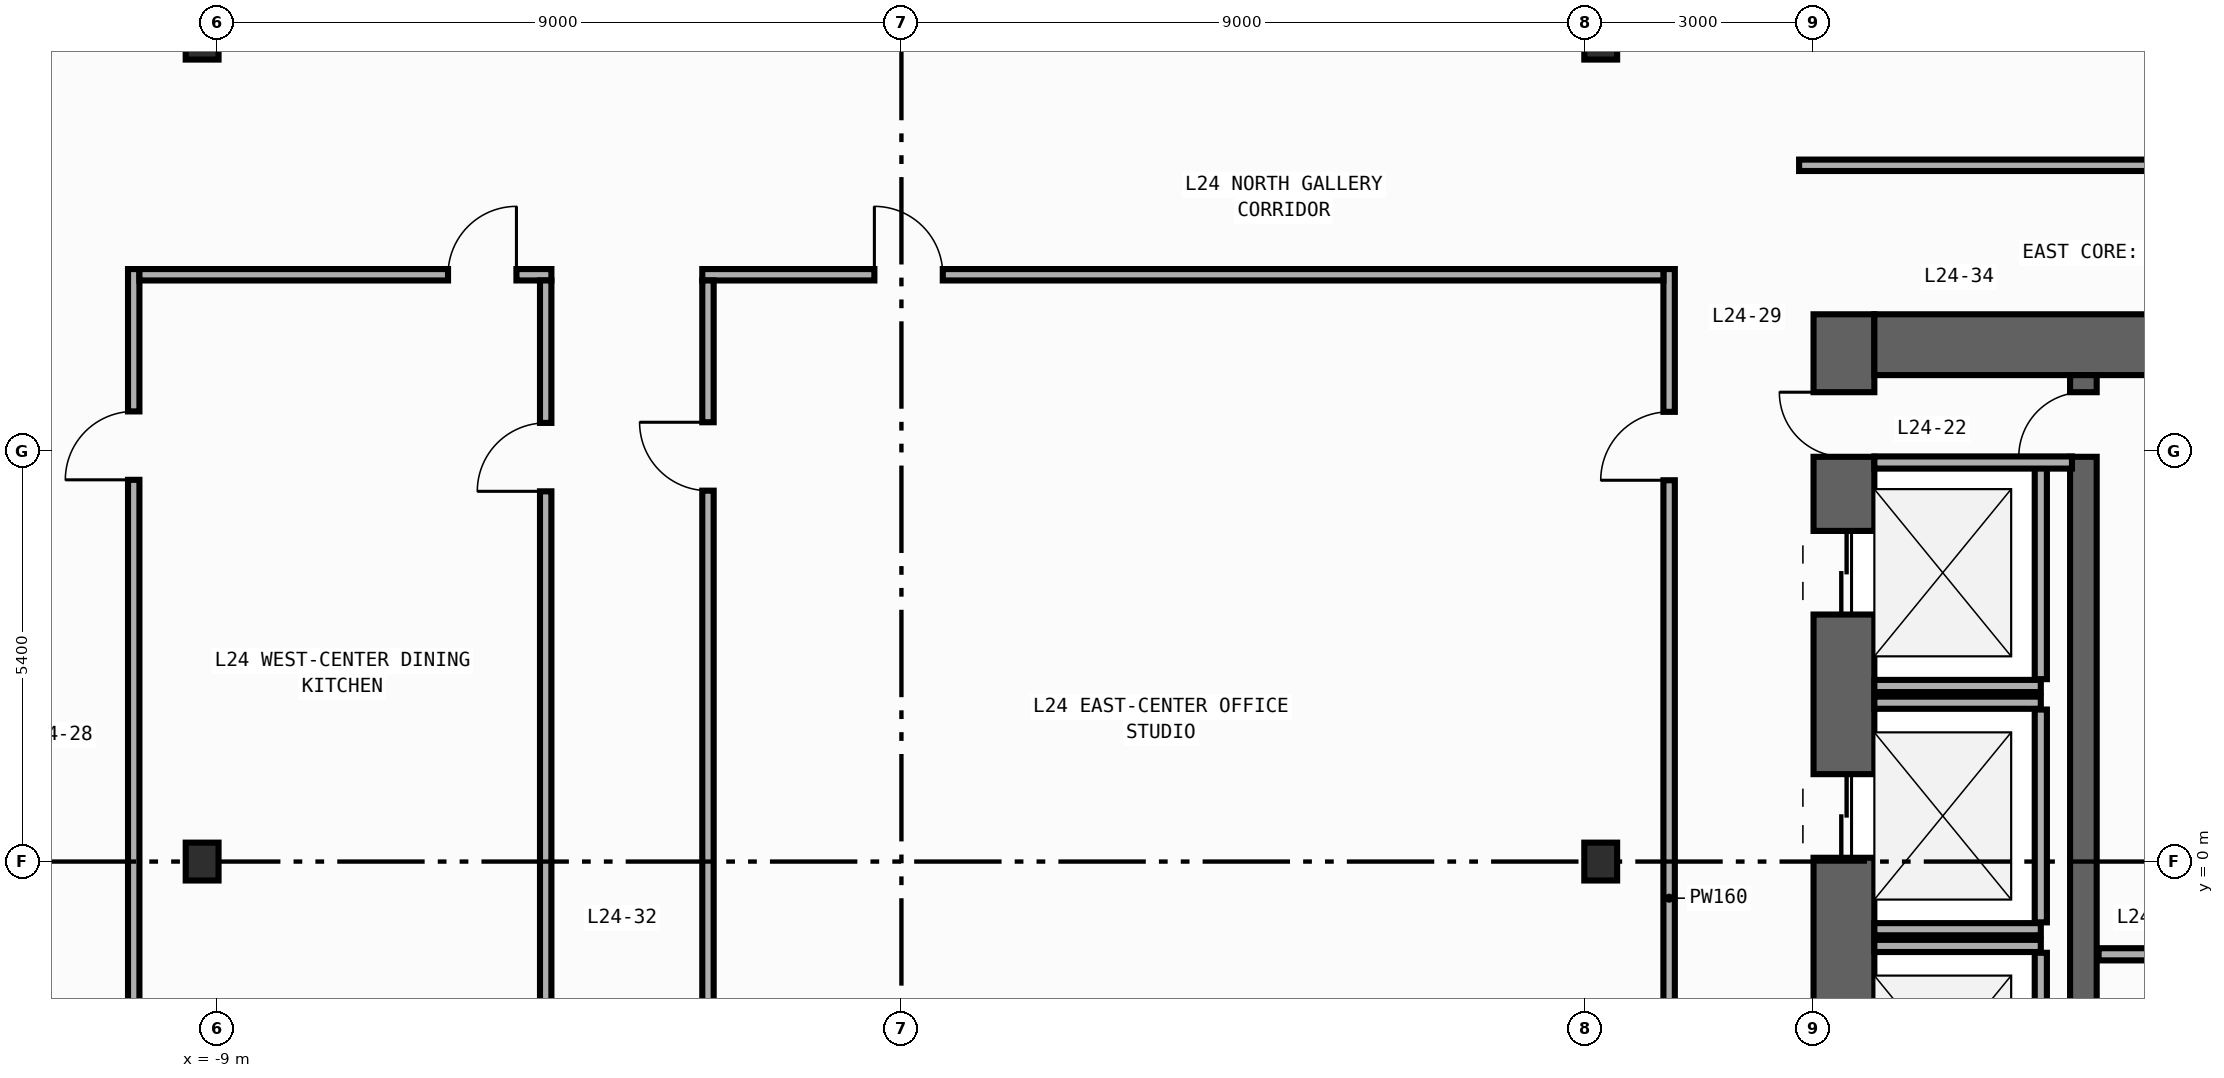
"""IFC4 building model, lengths in metres.
Left out: names, types, materials, properties, quantities, classifications, styles, units other than length and angle.
Written with IfcOpenShell. Run it as: python <this file> out.ifc"""

import sys

from ifc_helpers import new_model, si_unit, direction, frame, frame_2d, origin, origin_2d, place, context, subcontext, project, spatial, rectangle, i_section, extrude, element, fill, save


model = new_model("IFC4")
c1 = context("Model", 3, precision=1e-05, world=origin(), true_north=direction((0.0, 1.0)))
c2 = subcontext(c1, "Body", "Model", "MODEL_VIEW")
j1 = project(units=[si_unit("LENGTHUNIT", "METRE"), si_unit("PLANEANGLEUNIT", "RADIAN")], contexts=[c1])
p1 = place(None, origin())
s1 = spatial("IfcSite", under=j1, at=p1, CompositionType="ELEMENT")
p2 = place(p1, origin())
s2 = spatial("IfcBuilding", under=s1, at=p2, CompositionType="ELEMENT")
p3 = place(p2, frame((0.0, 0.0, 105.8)))
s3 = spatial("IfcBuildingStorey", under=s2, at=p3, CompositionType="ELEMENT", Elevation=105.8)
p4 = place(p3, frame((12.4, -19.8, 0.0), z_axis=(0.0, 0.0, 1.0), x_axis=(0.0, 1.0, 0.0)))
e1 = element("IfcWall", 1, at=p4, inside=s3, PredefinedType="SHEAR", context=c2, shape_type="SweptSolid", body=[
    extrude(rectangle(XDim=27.0, YDim=0.8, at=frame_2d((13.5, 0.0))), origin(), (0.0, 0.0, 1.0), 3.94),
])
p5 = place(p4, frame((23.05, 0.0, 0.0)))
e2 = element("IfcOpeningElement", 2, at=p5, cuts=e1, PredefinedType="OPENING", context=c2, shape_type="SweptSolid", body=[
    extrude(rectangle(XDim=1.1, YDim=2.2, at=frame_2d((0.55, 1.1))), frame((0.0, 0.41, 0.0), z_axis=(0.0, -1.0, 0.0), x_axis=(1.0, 0.0, 0.0)), (0.0, 0.0, 1.0), 0.82),
])
p6 = place(p4, frame((19.85, 0.0, 0.0)))
e3 = element("IfcOpeningElement", 3, at=p6, cuts=e1, PredefinedType="OPENING", context=c2, shape_type="SweptSolid", body=[
    extrude(rectangle(XDim=1.1, YDim=2.2, at=frame_2d((0.55, 1.1))), frame((0.0, 0.41, 0.0), z_axis=(0.0, -1.0, 0.0), x_axis=(1.0, 0.0, 0.0)), (0.0, 0.0, 1.0), 0.82),
])
p7 = place(p4, frame((16.65, 0.0, 0.0)))
e4 = element("IfcOpeningElement", 4, at=p7, cuts=e1, PredefinedType="OPENING", context=c2, shape_type="SweptSolid", body=[
    extrude(rectangle(XDim=1.1, YDim=2.2, at=frame_2d((0.55, 1.1))), frame((0.0, 0.41, 0.0), z_axis=(0.0, -1.0, 0.0), x_axis=(1.0, 0.0, 0.0)), (0.0, 0.0, 1.0), 0.82),
])
p8 = place(p4, frame((7.175, 0.0, 0.0)))
e5 = element("IfcOpeningElement", 5, at=p8, cuts=e1, PredefinedType="OPENING", context=c2, shape_type="SweptSolid", body=[
    extrude(rectangle(XDim=0.85, YDim=2.1, at=frame_2d((0.425, 1.05))), frame((0.0, 0.41, 0.0), z_axis=(0.0, -1.0, 0.0), x_axis=(1.0, 0.0, 0.0)), (0.0, 0.0, 1.0), 0.82),
])
p9 = place(p4, frame((10.375, 0.0, 0.0)))
e6 = element("IfcOpeningElement", 6, at=p9, cuts=e1, PredefinedType="OPENING", context=c2, shape_type="SweptSolid", body=[
    extrude(rectangle(XDim=0.85, YDim=2.1, at=frame_2d((0.425, 1.05))), frame((0.0, 0.41, 0.0), z_axis=(0.0, -1.0, 0.0), x_axis=(1.0, 0.0, 0.0)), (0.0, 0.0, 1.0), 0.82),
])
p10 = place(p4, frame((12.725, 0.0, 0.0)))
e7 = element("IfcOpeningElement", 7, at=p10, cuts=e1, PredefinedType="OPENING", context=c2, shape_type="SweptSolid", body=[
    extrude(rectangle(XDim=1.15, YDim=2.2, at=frame_2d((0.575, 1.1))), frame((0.0, 0.41, 0.0), z_axis=(0.0, -1.0, 0.0), x_axis=(1.0, 0.0, 0.0)), (0.0, 0.0, 1.0), 0.82),
])
p11 = place(p4, frame((25.125, 0.0, 0.0)))
e8 = element("IfcOpeningElement", 8, at=p11, cuts=e1, PredefinedType="OPENING", context=c2, shape_type="SweptSolid", body=[
    extrude(rectangle(XDim=0.85, YDim=2.1, at=frame_2d((0.425, 1.05))), frame((0.0, 0.41, 0.0), z_axis=(0.0, -1.0, 0.0), x_axis=(1.0, 0.0, 0.0)), (0.0, 0.0, 1.0), 0.82),
])
p12 = place(p3, frame((12.8, 6.8, 0.0), z_axis=(0.0, 0.0, 1.0), x_axis=(1.0, 0.0, 0.0)))
e9 = element("IfcWall", 9, at=p12, inside=s3, PredefinedType="SHEAR", context=c2, shape_type="SweptSolid", body=[
    extrude(rectangle(XDim=6.8, YDim=0.8, at=frame_2d((3.4, 0.0))), origin(), (0.0, 0.0, 1.0), 3.94),
])
p13 = place(p3, frame((15.55, -19.0, 0.0), z_axis=(0.0, 0.0, 1.0), x_axis=(0.0, 1.0, 0.0)))
e10 = element("IfcWall", 10, at=p13, inside=s3, PredefinedType="SHEAR", context=c2, shape_type="SweptSolid", body=[
    extrude(rectangle(XDim=25.4, YDim=0.35, at=frame_2d((12.7, 0.0))), origin(), (0.0, 0.0, 1.0), 3.94),
])
p14 = place(p13, frame((11.925, 0.0, 0.0)))
e11 = element("IfcOpeningElement", 11, at=p14, cuts=e10, PredefinedType="OPENING", context=c2, shape_type="SweptSolid", body=[
    extrude(rectangle(XDim=1.15, YDim=2.2, at=frame_2d((0.575, 1.1))), frame((0.0, 0.185, 0.0), z_axis=(0.0, -1.0, 0.0), x_axis=(1.0, 0.0, 0.0)), (0.0, 0.0, 1.0), 0.37),
])
p15 = place(p13, frame((24.325, 0.0, 0.0)))
e12 = element("IfcOpeningElement", 12, at=p15, cuts=e10, PredefinedType="OPENING", context=c2, shape_type="SweptSolid", body=[
    extrude(rectangle(XDim=0.85, YDim=2.1, at=frame_2d((0.425, 1.05))), frame((0.0, 0.185, 0.0), z_axis=(0.0, -1.0, 0.0), x_axis=(1.0, 0.0, 0.0)), (0.0, 0.0, 1.0), 0.37),
])
for number, where, z_axis, x_axis in (
    (13, (-9.2, 0.0, 0.0), (0.0, 0.0, 1.0), (1.0, 0.0, 0.0)),
    (14, (-9.2, 10.8, 0.0), (0.0, 0.0, 1.0), (1.0, 0.0, 0.0)),
    (15, (9.2, 0.0, 0.0), (0.0, 0.0, 1.0), (1.0, 0.0, 0.0)),
    (16, (9.2, 10.8, 0.0), (0.0, 0.0, 1.0), (1.0, 0.0, 0.0)),
):
    element("IfcColumn", number, at=place(p3, frame(where, z_axis=z_axis, x_axis=x_axis)), inside=s3, PredefinedType="COLUMN", context=c2, shape_type="SweptSolid", body=[
        extrude(i_section(OverallWidth=0.432, OverallDepth=0.498, WebThickness=0.045, FlangeThickness=0.07, FilletRadius=0.022, at=origin_2d()), origin(), (0.0, 0.0, 1.0), 4.2),
    ])
p16 = place(p3, frame((12.8, 2.31, 0.0), z_axis=(0.0, 0.0, 1.0), x_axis=(1.0, 0.0, 0.0)))
e17 = element("IfcWall", 17, at=p16, inside=s3, PredefinedType="STANDARD", context=c2, shape_type="SweptSolid", body=[
    extrude(rectangle(XDim=2.19, YDim=0.16, at=frame_2d((1.095, 0.0))), origin(), (0.0, 0.0, 1.0), 3.94),
])
p17 = place(p3, frame((14.99, 2.4, 0.0), z_axis=(0.0, 0.0, 1.0), x_axis=(0.0, 1.0, 0.0)))
e18 = element("IfcWall", 18, at=p17, inside=s3, PredefinedType="STANDARD", context=c2, shape_type="SweptSolid", body=[
    extrude(rectangle(XDim=2.8, YDim=0.16, at=frame_2d((1.4, 0.0))), origin(), (0.0, 0.0, 1.0), 3.94),
])
for number, where, z_axis, x_axis in (
    (19, (12.8, -0.89, 0.0), (0.0, 0.0, 1.0), (1.0, 0.0, 0.0)),
    (20, (12.8, 2.09, 0.0), (0.0, 0.0, 1.0), (1.0, 0.0, 0.0)),
):
    element("IfcWall", number, at=place(p3, frame(where, z_axis=z_axis, x_axis=x_axis)), inside=s3, PredefinedType="STANDARD", context=c2, shape_type="SweptSolid", body=[
        extrude(rectangle(XDim=2.19, YDim=0.16, at=frame_2d((1.095, 0.0))), origin(), (0.0, 0.0, 1.0), 3.94),
    ])
p18 = place(p3, frame((14.99, -0.8, 0.0), z_axis=(0.0, 0.0, 1.0), x_axis=(0.0, 1.0, 0.0)))
e21 = element("IfcWall", 21, at=p18, inside=s3, PredefinedType="STANDARD", context=c2, shape_type="SweptSolid", body=[
    extrude(rectangle(XDim=2.8, YDim=0.16, at=frame_2d((1.4, 0.0))), origin(), (0.0, 0.0, 1.0), 3.94),
])
p19 = place(p3, frame((12.8, -1.11, 0.0), z_axis=(0.0, 0.0, 1.0), x_axis=(1.0, 0.0, 0.0)))
e22 = element("IfcWall", 22, at=p19, inside=s3, PredefinedType="STANDARD", context=c2, shape_type="SweptSolid", body=[
    extrude(rectangle(XDim=2.19, YDim=0.16, at=frame_2d((1.095, 0.0))), origin(), (0.0, 0.0, 1.0), 3.94),
])
p20 = place(p3, frame((14.99, -4.0, 0.0), z_axis=(0.0, 0.0, 1.0), x_axis=(0.0, 1.0, 0.0)))
e23 = element("IfcWall", 23, at=p20, inside=s3, PredefinedType="STANDARD", context=c2, shape_type="SweptSolid", body=[
    extrude(rectangle(XDim=2.8, YDim=0.16, at=frame_2d((1.4, 0.0))), origin(), (0.0, 0.0, 1.0), 3.94),
])
p21 = place(p3, frame((15.75, -1.22, 0.0), z_axis=(0.0, 0.0, 1.0), x_axis=(1.0, 0.0, 0.0)))
e24 = element("IfcWall", 24, at=p21, inside=s3, PredefinedType="STANDARD", context=c2, shape_type="SweptSolid", body=[
    extrude(rectangle(XDim=3.8, YDim=0.16, at=frame_2d((1.9, 0.0))), origin(), (0.0, 0.0, 1.0), 3.94),
])
p22 = place(p3, frame((12.8, 5.25, 0.0), z_axis=(0.0, 0.0, 1.0), x_axis=(1.0, 0.0, 0.0)))
e25 = element("IfcWall", 25, at=p22, inside=s3, PredefinedType="STANDARD", context=c2, shape_type="SweptSolid", body=[
    extrude(rectangle(XDim=2.6, YDim=0.16, at=frame_2d((1.3, 0.0))), origin(), (0.0, 0.0, 1.0), 3.94),
])
p23 = place(p3, frame((-10.1, -4.52, 0.0), z_axis=(0.0, 0.0, 1.0), x_axis=(0.0, 1.0, 0.0)))
e26 = element("IfcWall", 26, at=p23, inside=s3, PredefinedType="PARTITIONING", context=c2, shape_type="SweptSolid", body=[
    extrude(rectangle(XDim=12.315, YDim=0.15, at=frame_2d((6.157, 0.0))), origin(), (0.0, 0.0, 1.0), 3.94),
])
p24 = place(p23, frame((9.542, 0.0, 0.0)))
e27 = element("IfcOpeningElement", 27, at=p24, cuts=e26, PredefinedType="OPENING", context=c2, shape_type="SweptSolid", body=[
    extrude(rectangle(XDim=0.9, YDim=2.15, at=frame_2d((0.45, 1.075))), frame((0.0, 0.085, 0.0), z_axis=(0.0, -1.0, 0.0), x_axis=(1.0, 0.0, 0.0)), (0.0, 0.0, 1.0), 0.17),
])
p25 = place(p3, frame((10.1, -5.98, 0.0), z_axis=(0.0, 0.0, 1.0), x_axis=(0.0, 1.0, 0.0)))
e28 = element("IfcWall", 28, at=p25, inside=s3, PredefinedType="PARTITIONING", context=c2, shape_type="SweptSolid", body=[
    extrude(rectangle(XDim=13.775, YDim=0.15, at=frame_2d((6.887, 0.0))), origin(), (0.0, 0.0, 1.0), 3.94),
])
p26 = place(p25, frame((10.997, 0.0, 0.0)))
e29 = element("IfcOpeningElement", 29, at=p26, cuts=e28, PredefinedType="OPENING", context=c2, shape_type="SweptSolid", body=[
    extrude(rectangle(XDim=0.9, YDim=2.15, at=frame_2d((0.45, 1.075))), frame((0.0, 0.085, 0.0), z_axis=(0.0, -1.0, 0.0), x_axis=(1.0, 0.0, 0.0)), (0.0, 0.0, 1.0), 0.17),
])
p27 = place(p3, frame((-2.62, 7.72, 0.0), z_axis=(0.0, 0.0, 1.0), x_axis=(1.0, 0.0, 0.0)))
e30 = element("IfcWall", 30, at=p27, inside=s3, PredefinedType="PARTITIONING", context=c2, shape_type="SweptSolid", body=[
    extrude(rectangle(XDim=12.645, YDim=0.15, at=frame_2d((6.323, 0.0))), origin(), (0.0, 0.0, 1.0), 3.94),
])
p28 = place(p27, frame((2.264, 0.0, 0.0)))
e31 = element("IfcOpeningElement", 31, at=p28, cuts=e30, PredefinedType="OPENING", context=c2, shape_type="SweptSolid", body=[
    extrude(rectangle(XDim=0.9, YDim=2.15, at=frame_2d((0.45, 1.075))), frame((0.0, 0.085, 0.0), z_axis=(0.0, -1.0, 0.0), x_axis=(1.0, 0.0, 0.0)), (0.0, 0.0, 1.0), 0.17),
])
p29 = place(p3, frame((-10.025, 7.72, 0.0), z_axis=(0.0, 0.0, 1.0), x_axis=(1.0, 0.0, 0.0)))
e32 = element("IfcWall", 32, at=p29, inside=s3, PredefinedType="PARTITIONING", context=c2, shape_type="SweptSolid", body=[
    extrude(rectangle(XDim=5.42, YDim=0.15, at=frame_2d((2.71, 0.0))), origin(), (0.0, 0.0, 1.0), 3.94),
])
p30 = place(p29, frame((4.06, 0.0, 0.0)))
e33 = element("IfcOpeningElement", 33, at=p30, cuts=e32, PredefinedType="OPENING", context=c2, shape_type="SweptSolid", body=[
    extrude(rectangle(XDim=0.9, YDim=2.15, at=frame_2d((0.45, 1.075))), frame((0.0, 0.085, 0.0), z_axis=(0.0, -1.0, 0.0), x_axis=(1.0, 0.0, 0.0)), (0.0, 0.0, 1.0), 0.17),
])
p31 = place(p3, frame((-2.545, -5.82, 0.0), z_axis=(0.0, 0.0, 1.0), x_axis=(0.0, 1.0, 0.0)))
e34 = element("IfcWall", 34, at=p31, inside=s3, PredefinedType="PARTITIONING", context=c2, shape_type="SweptSolid", body=[
    extrude(rectangle(XDim=13.465, YDim=0.15, at=frame_2d((6.732, 0.0))), origin(), (0.0, 0.0, 1.0), 3.94),
])
p32 = place(p31, frame((10.7, 0.0, 0.0)))
e35 = element("IfcOpeningElement", 35, at=p32, cuts=e34, PredefinedType="OPENING", context=c2, shape_type="SweptSolid", body=[
    extrude(rectangle(XDim=0.9, YDim=2.15, at=frame_2d((0.45, 1.075))), frame((0.0, 0.085, 0.0), z_axis=(0.0, -1.0, 0.0), x_axis=(1.0, 0.0, 0.0)), (0.0, 0.0, 1.0), 0.17),
])
p33 = place(p3, frame((-4.68, -4.68, 0.0), z_axis=(0.0, 0.0, 1.0), x_axis=(0.0, 1.0, 0.0)))
e36 = element("IfcWall", 36, at=p33, inside=s3, PredefinedType="PARTITIONING", context=c2, shape_type="SweptSolid", body=[
    extrude(rectangle(XDim=12.325, YDim=0.15, at=frame_2d((6.163, 0.0))), origin(), (0.0, 0.0, 1.0), 3.49),
])
p34 = place(p33, frame((9.551, 0.0, 0.0)))
e37 = element("IfcOpeningElement", 37, at=p34, cuts=e36, PredefinedType="OPENING", context=c2, shape_type="SweptSolid", body=[
    extrude(rectangle(XDim=0.9, YDim=2.15, at=frame_2d((0.45, 1.075))), frame((0.0, 0.085, 0.0), z_axis=(0.0, -1.0, 0.0), x_axis=(1.0, 0.0, 0.0)), (0.0, 0.0, 1.0), 0.17),
])
p35 = place(p3, frame((11.81, 9.16, 0.0), z_axis=(0.0, 0.0, 1.0), x_axis=(1.0, 0.0, 0.0)))
e38 = element("IfcWall", 38, at=p35, inside=s3, PredefinedType="PARTITIONING", context=c2, shape_type="SweptSolid", body=[
    extrude(rectangle(XDim=8.83, YDim=0.15, at=frame_2d((4.415, 0.0))), origin(), (0.0, 0.0, 1.0), 3.94),
])
p36 = place(p35, frame((5.067, 0.0, 0.0)))
e39 = element("IfcOpeningElement", 39, at=p36, cuts=e38, PredefinedType="OPENING", context=c2, shape_type="SweptSolid", body=[
    extrude(rectangle(XDim=0.9, YDim=2.15, at=frame_2d((0.45, 1.075))), frame((0.0, 0.085, 0.0), z_axis=(0.0, -1.0, 0.0), x_axis=(1.0, 0.0, 0.0)), (0.0, 0.0, 1.0), 0.17),
])
p37 = place(p5, origin())
e40 = element("IfcDoor", 40, at=p37, inside=s3, OperationType="DOUBLE_DOOR_SLIDING", PredefinedType="DOOR", context=c2, shape_type="SweptSolid", body=[
    extrude(rectangle(XDim=1.1, YDim=2.2, at=frame_2d((0.55, 1.1))), frame((0.0, 0.025, 0.0), z_axis=(0.0, -1.0, 0.0), x_axis=(1.0, 0.0, 0.0)), (0.0, 0.0, 1.0), 0.05),
])
fill(e2, e40)
p38 = place(p6, origin())
e41 = element("IfcDoor", 41, at=p38, inside=s3, OperationType="DOUBLE_DOOR_SLIDING", PredefinedType="DOOR", context=c2, shape_type="SweptSolid", body=[
    extrude(rectangle(XDim=1.1, YDim=2.2, at=frame_2d((0.55, 1.1))), frame((0.0, 0.025, 0.0), z_axis=(0.0, -1.0, 0.0), x_axis=(1.0, 0.0, 0.0)), (0.0, 0.0, 1.0), 0.05),
])
fill(e3, e41)
p39 = place(p11, origin())
e42 = element("IfcDoor", 42, at=p39, inside=s3, OperationType="SINGLE_SWING_RIGHT", PredefinedType="DOOR", context=c2, shape_type="SweptSolid", body=[
    extrude(rectangle(XDim=0.85, YDim=2.1, at=frame_2d((0.425, 1.05))), frame((0.0, 0.025, 0.0), z_axis=(0.0, -1.0, 0.0), x_axis=(1.0, 0.0, 0.0)), (0.0, 0.0, 1.0), 0.05),
])
fill(e8, e42)
p40 = place(p15, origin())
e43 = element("IfcDoor", 43, at=p40, inside=s3, OperationType="SINGLE_SWING_LEFT", PredefinedType="DOOR", context=c2, shape_type="SweptSolid", body=[
    extrude(rectangle(XDim=0.85, YDim=2.1, at=frame_2d((0.425, 1.05))), frame((0.0, 0.025, 0.0), z_axis=(0.0, -1.0, 0.0), x_axis=(1.0, 0.0, 0.0)), (0.0, 0.0, 1.0), 0.05),
])
fill(e12, e43)
p41 = place(p24, origin())
e44 = element("IfcDoor", 44, at=p41, inside=s3, OperationType="SINGLE_SWING_LEFT", PredefinedType="DOOR", context=c2, shape_type="SweptSolid", body=[
    extrude(rectangle(XDim=0.9, YDim=2.15, at=frame_2d((0.45, 1.075))), frame((0.0, 0.025, 0.0), z_axis=(0.0, -1.0, 0.0), x_axis=(1.0, 0.0, 0.0)), (0.0, 0.0, 1.0), 0.05),
])
fill(e27, e44)
p42 = place(p26, origin())
e45 = element("IfcDoor", 45, at=p42, inside=s3, OperationType="SINGLE_SWING_LEFT", PredefinedType="DOOR", context=c2, shape_type="SweptSolid", body=[
    extrude(rectangle(XDim=0.9, YDim=2.15, at=frame_2d((0.45, 1.075))), frame((0.0, 0.025, 0.0), z_axis=(0.0, -1.0, 0.0), x_axis=(1.0, 0.0, 0.0)), (0.0, 0.0, 1.0), 0.05),
])
fill(e29, e45)
p43 = place(p28, origin())
e46 = element("IfcDoor", 46, at=p43, inside=s3, OperationType="SINGLE_SWING_LEFT", PredefinedType="DOOR", context=c2, shape_type="SweptSolid", body=[
    extrude(rectangle(XDim=0.9, YDim=2.15, at=frame_2d((0.45, 1.075))), frame((0.0, 0.025, 0.0), z_axis=(0.0, -1.0, 0.0), x_axis=(1.0, 0.0, 0.0)), (0.0, 0.0, 1.0), 0.05),
])
fill(e31, e46)
p44 = place(p30, origin())
e47 = element("IfcDoor", 47, at=p44, inside=s3, OperationType="SINGLE_SWING_RIGHT", PredefinedType="DOOR", context=c2, shape_type="SweptSolid", body=[
    extrude(rectangle(XDim=0.9, YDim=2.15, at=frame_2d((0.45, 1.075))), frame((0.0, 0.025, 0.0), z_axis=(0.0, -1.0, 0.0), x_axis=(1.0, 0.0, 0.0)), (0.0, 0.0, 1.0), 0.05),
])
fill(e33, e47)
p45 = place(p32, origin())
e48 = element("IfcDoor", 48, at=p45, inside=s3, OperationType="SINGLE_SWING_RIGHT", PredefinedType="DOOR", context=c2, shape_type="SweptSolid", body=[
    extrude(rectangle(XDim=0.9, YDim=2.15, at=frame_2d((0.45, 1.075))), frame((0.0, 0.025, 0.0), z_axis=(0.0, -1.0, 0.0), x_axis=(1.0, 0.0, 0.0)), (0.0, 0.0, 1.0), 0.05),
])
fill(e35, e48)
p46 = place(p34, origin())
e49 = element("IfcDoor", 49, at=p46, inside=s3, OperationType="SINGLE_SWING_LEFT", PredefinedType="DOOR", context=c2, shape_type="SweptSolid", body=[
    extrude(rectangle(XDim=0.9, YDim=2.15, at=frame_2d((0.45, 1.075))), frame((0.0, 0.025, 0.0), z_axis=(0.0, -1.0, 0.0), x_axis=(1.0, 0.0, 0.0)), (0.0, 0.0, 1.0), 0.05),
])
fill(e37, e49)
save(model, sys.argv[1])
